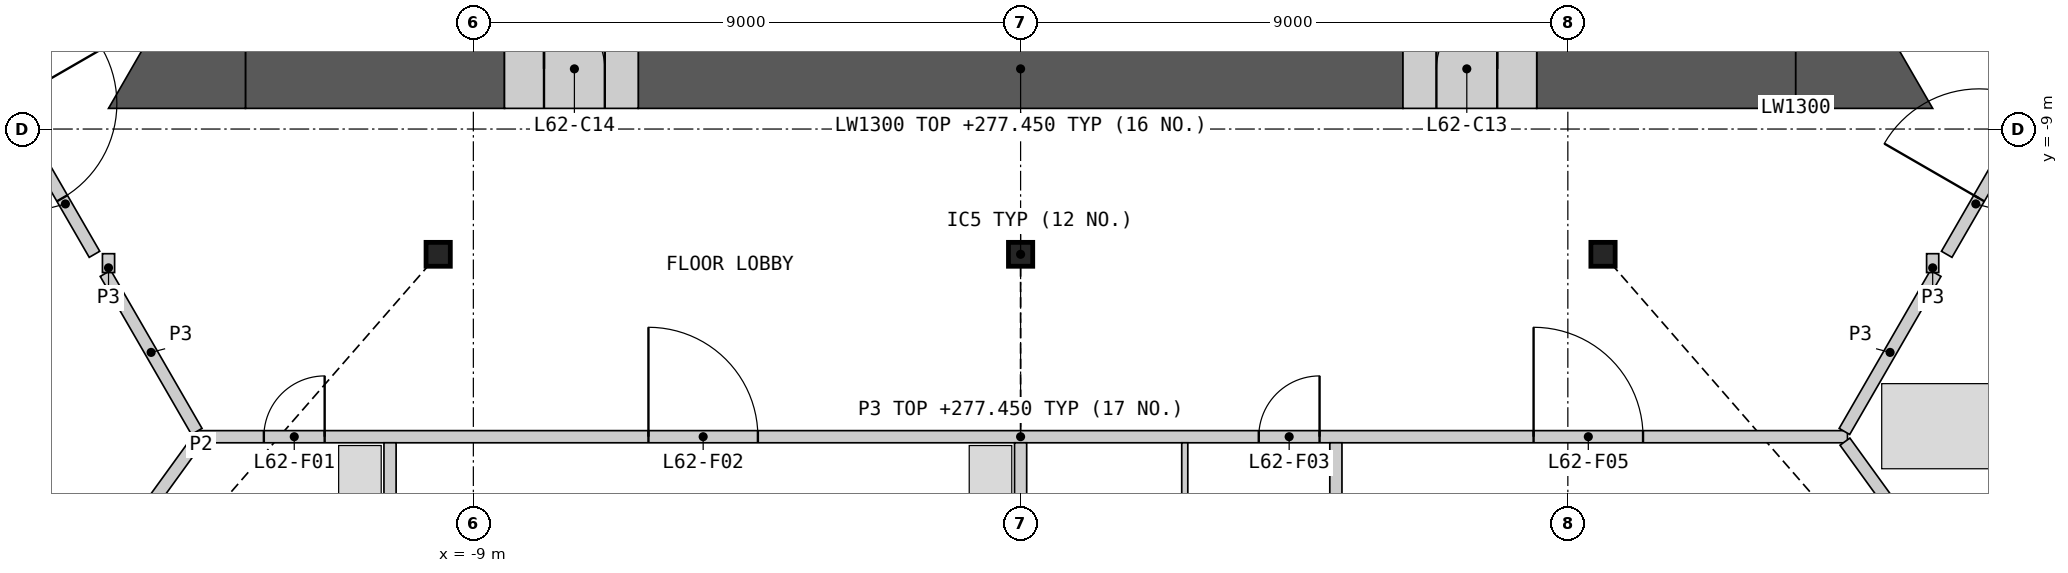
"""IFC4 building model, lengths in metres.
Left out: names, types, materials, properties, quantities, classifications, styles, units other than length and angle.
Written with IfcOpenShell. Run it as: python <this file> out.ifc"""

import sys

from ifc_helpers import new_model, si_unit, direction, frame, frame_2d, origin, origin_2d, place, context, subcontext, project, spatial, polyline, rectangle, i_section, outline, extrude, element, fill, save


model = new_model("IFC4")
c1 = context("Model", 3, precision=1e-05, world=origin(), true_north=direction((0.0, 1.0)))
c2 = subcontext(c1, "Body", "Model", "MODEL_VIEW")
j1 = project(units=[si_unit("LENGTHUNIT", "METRE"), si_unit("PLANEANGLEUNIT", "RADIAN")], contexts=[c1])
p1 = place(None, origin())
s1 = spatial("IfcSite", under=j1, at=p1, CompositionType="ELEMENT")
p2 = place(p1, origin())
s2 = spatial("IfcBuilding", under=s1, at=p2, CompositionType="ELEMENT")
p3 = place(p2, frame((0.0, 0.0, 274.2)))
s3 = spatial("IfcBuildingStorey", under=s2, at=p3, CompositionType="ELEMENT", Elevation=274.2)
for number, where, z_axis, x_axis in (
    (1, (-9.578, -11.06, 0.0), (0.0, 0.0, 1.0), (1.0, 0.0, 0.0)),
    (2, (0.0, -11.06, 0.0), (0.0, 0.0, 1.0), (1.0, 0.0, 0.0)),
    (3, (9.578, -11.06, 0.0), (0.0, 0.0, 1.0), (1.0, 0.0, 0.0)),
):
    element("IfcColumn", number, at=place(p3, frame(where, z_axis=z_axis, x_axis=x_axis)), inside=s3, PredefinedType="COLUMN", context=c2, shape_type="SweptSolid", body=[
        extrude(i_section(OverallWidth=0.399, OverallDepth=0.393, WebThickness=0.023, FlangeThickness=0.037, at=origin_2d()), origin(), (0.0, 0.0, 1.0), 3.6),
    ])
p4 = place(p3, frame((-6.288, -8.01, 0.0), z_axis=(0.0, 0.0, 1.0), x_axis=(1.0, 0.0, 0.0)))
e4 = element("IfcWall", 4, at=p4, inside=s3, PredefinedType="SHEAR", context=c2, shape_type="SweptSolid", body=[
    extrude(rectangle(XDim=12.576, YDim=1.3, at=frame_2d((6.288, 0.0))), origin(), (0.0, 0.0, 1.0), 3.25),
])
for number, where, z_axis, x_axis in (
    (5, (8.488, -8.01, 0.0), (0.0, 0.0, 1.0), (1.0, 0.0, 0.0)),
    (6, (-12.748, -8.01, 0.0), (0.0, 0.0, 1.0), (1.0, 0.0, 0.0)),
):
    element("IfcWall", number, at=place(p3, frame(where, z_axis=z_axis, x_axis=x_axis)), inside=s3, PredefinedType="SHEAR", context=c2, shape_type="SweptSolid", body=[
        extrude(rectangle(XDim=4.26, YDim=1.3, at=frame_2d((2.13, 0.0))), origin(), (0.0, 0.0, 1.0), 3.25),
    ])
p5 = place(p3, origin())
e7 = element("IfcWall", 7, at=p5, inside=s3, PredefinedType="SHEAR", context=c2, shape_type="SweptSolid", body=[
    extrude(outline(polyline([(12.748, -8.66), (12.748, -7.36), (13.874, -6.71), (15.0, -8.66), (12.748, -8.66)])), origin(), (0.0, 0.0, 1.0), 3.25),
])
p6 = place(p3, origin())
e8 = element("IfcWall", 8, at=p6, inside=s3, PredefinedType="SHEAR", context=c2, shape_type="SweptSolid", body=[
    extrude(outline(polyline([(-13.874, -6.71), (-12.748, -7.36), (-12.748, -8.66), (-15.0, -8.66), (-13.874, -6.71)])), origin(), (0.0, 0.0, 1.0), 3.25),
])
p7 = place(p3, frame((6.288, -8.01, 0.0), z_axis=(0.0, 0.0, 1.0), x_axis=(1.0, 0.0, 0.0)))
e9 = element("IfcWall", 9, at=p7, inside=s3, PredefinedType="SHEAR", context=c2, shape_type="SweptSolid", body=[
    extrude(rectangle(XDim=2.2, YDim=1.3, at=frame_2d((1.1, 0.0))), origin(), (0.0, 0.0, 1.0), 3.25),
])
p8 = place(p7, frame((0.55, 0.0, 0.0)))
e10 = element("IfcOpeningElement", 10, at=p8, cuts=e9, PredefinedType="OPENING", context=c2, shape_type="SweptSolid", body=[
    extrude(rectangle(XDim=1.0, YDim=2.1, at=frame_2d((0.5, 1.05))), frame((0.0, 0.66, 0.0), z_axis=(0.0, -1.0, 0.0), x_axis=(1.0, 0.0, 0.0)), (0.0, 0.0, 1.0), 1.32),
])
p9 = place(p3, frame((-8.488, -8.01, 0.0), z_axis=(0.0, 0.0, 1.0), x_axis=(1.0, 0.0, 0.0)))
e11 = element("IfcWall", 11, at=p9, inside=s3, PredefinedType="SHEAR", context=c2, shape_type="SweptSolid", body=[
    extrude(rectangle(XDim=2.2, YDim=1.3, at=frame_2d((1.1, 0.0))), origin(), (0.0, 0.0, 1.0), 3.25),
])
p10 = place(p9, frame((0.65, 0.0, 0.0)))
e12 = element("IfcOpeningElement", 12, at=p10, cuts=e11, PredefinedType="OPENING", context=c2, shape_type="SweptSolid", body=[
    extrude(rectangle(XDim=1.0, YDim=2.1, at=frame_2d((0.5, 1.05))), frame((0.0, 0.66, 0.0), z_axis=(0.0, -1.0, 0.0), x_axis=(1.0, 0.0, 0.0)), (0.0, 0.0, 1.0), 1.32),
])
p11 = place(p3, frame((-13.599, -14.06, 0.0), z_axis=(0.0, 0.0, 1.0), x_axis=(1.0, 0.0, 0.0)))
e13 = element("IfcWall", 13, at=p11, inside=s3, PredefinedType="PARTITIONING", context=c2, shape_type="SweptSolid", body=[
    extrude(rectangle(XDim=27.198, YDim=0.2, at=frame_2d((13.599, 0.0))), origin(), (0.0, 0.0, 1.0), 3.25),
])
p12 = place(p11, frame((1.153, 0.0, 0.0)))
e14 = element("IfcOpeningElement", 14, at=p12, cuts=e13, PredefinedType="OPENING", context=c2, shape_type="SweptSolid", body=[
    extrude(rectangle(XDim=1.0, YDim=2.1, at=frame_2d((0.5, 1.05))), frame((0.0, 0.11, 0.0), z_axis=(0.0, -1.0, 0.0), x_axis=(1.0, 0.0, 0.0)), (0.0, 0.0, 1.0), 0.22),
])
p13 = place(p11, frame((7.478, 0.0, 0.0)))
e15 = element("IfcOpeningElement", 15, at=p13, cuts=e13, PredefinedType="OPENING", context=c2, shape_type="SweptSolid", body=[
    extrude(rectangle(XDim=1.8, YDim=2.1, at=frame_2d((0.9, 1.05))), frame((0.0, 0.11, 0.0), z_axis=(0.0, -1.0, 0.0), x_axis=(1.0, 0.0, 0.0)), (0.0, 0.0, 1.0), 0.22),
])
p14 = place(p11, frame((17.516, 0.0, 0.0)))
e16 = element("IfcOpeningElement", 16, at=p14, cuts=e13, PredefinedType="OPENING", context=c2, shape_type="SweptSolid", body=[
    extrude(rectangle(XDim=1.0, YDim=2.1, at=frame_2d((0.5, 1.05))), frame((0.0, 0.11, 0.0), z_axis=(0.0, -1.0, 0.0), x_axis=(1.0, 0.0, 0.0)), (0.0, 0.0, 1.0), 0.22),
])
p15 = place(p11, frame((22.036, 0.0, 0.0)))
e17 = element("IfcOpeningElement", 17, at=p15, cuts=e13, PredefinedType="OPENING", context=c2, shape_type="SweptSolid", body=[
    extrude(rectangle(XDim=1.8, YDim=2.1, at=frame_2d((0.9, 1.05))), frame((0.0, 0.11, 0.0), z_axis=(0.0, -1.0, 0.0), x_axis=(1.0, 0.0, 0.0)), (0.0, 0.0, 1.0), 0.22),
])
p16 = place(p3, frame((-17.244, -7.747, 0.0), z_axis=(0.0, 0.0, 1.0), x_axis=(0.500017753321, 0.866015153657, 0.0)))
e18 = element("IfcWall", 18, at=p16, inside=s3, PredefinedType="PARTITIONING", context=c2, shape_type="SweptSolid", body=[
    extrude(rectangle(XDim=5.51, YDim=0.2, at=frame_2d((2.755, 0.0))), origin(), (0.0, 0.0, 1.0), 3.25),
])
p17 = place(p16, frame((1.956, 0.0, 0.0)))
e19 = element("IfcOpeningElement", 19, at=p17, cuts=e18, PredefinedType="OPENING", context=c2, shape_type="SweptSolid", body=[
    extrude(rectangle(XDim=1.8, YDim=2.1, at=frame_2d((0.9, 1.05))), frame((0.0, 0.11, 0.0), z_axis=(0.0, -1.0, 0.0), x_axis=(1.0, 0.0, 0.0)), (0.0, 0.0, 1.0), 0.22),
])
p18 = place(p3, frame((14.806, -3.524, 0.0), z_axis=(0.0, 0.0, 1.0), x_axis=(0.499999813892, -0.866025511234, 0.0)))
e20 = element("IfcWall", 20, at=p18, inside=s3, PredefinedType="PARTITIONING", context=c2, shape_type="SweptSolid", body=[
    extrude(rectangle(XDim=4.876, YDim=0.2, at=frame_2d((2.438, 0.0))), origin(), (0.0, 0.0, 1.0), 3.25),
])
p19 = place(p18, frame((3.37, 0.0, 0.0)))
e21 = element("IfcOpeningElement", 21, at=p19, cuts=e20, PredefinedType="OPENING", context=c2, shape_type="SweptSolid", body=[
    extrude(rectangle(XDim=1.1, YDim=2.1, at=frame_2d((0.55, 1.05))), frame((0.0, 0.11, 0.0), z_axis=(0.0, -1.0, 0.0), x_axis=(1.0, 0.0, 0.0)), (0.0, 0.0, 1.0), 0.22),
])
p20 = place(p3, frame((15.231, -11.06, 0.0), z_axis=(0.0, 0.0, 1.0), x_axis=(0.499961815444, 0.866047448526, 0.0)))
e22 = element("IfcWall", 22, at=p20, inside=s3, PredefinedType="PARTITIONING", context=c2, shape_type="SweptSolid", body=[
    extrude(rectangle(XDim=3.826, YDim=0.2, at=frame_2d((1.913, 0.0))), origin(), (0.0, 0.0, 1.0), 3.25),
])
p21 = place(p20, frame((1.064, 0.0, 0.0)))
e23 = element("IfcOpeningElement", 23, at=p21, cuts=e22, PredefinedType="OPENING", context=c2, shape_type="SweptSolid", body=[
    extrude(rectangle(XDim=1.8, YDim=2.1, at=frame_2d((0.9, 1.05))), frame((0.0, 0.11, 0.0), z_axis=(0.0, -1.0, 0.0), x_axis=(1.0, 0.0, 0.0)), (0.0, 0.0, 1.0), 0.22),
])
p22 = place(p3, frame((-17.144, -7.747, 0.0), z_axis=(0.0, 0.0, 1.0), x_axis=(0.499961815444, -0.866047448526, 0.0)))
e24 = element("IfcWall", 24, at=p22, inside=s3, PredefinedType="PARTITIONING", context=c2, shape_type="SweptSolid", body=[
    extrude(rectangle(XDim=3.826, YDim=0.2, at=frame_2d((1.913, 0.0))), origin(), (0.0, 0.0, 1.0), 3.25),
])
p23 = place(p22, frame((0.962, 0.0, 0.0)))
e25 = element("IfcOpeningElement", 25, at=p23, cuts=e24, PredefinedType="OPENING", context=c2, shape_type="SweptSolid", body=[
    extrude(rectangle(XDim=1.8, YDim=2.1, at=frame_2d((0.9, 1.05))), frame((0.0, 0.11, 0.0), z_axis=(0.0, -1.0, 0.0), x_axis=(1.0, 0.0, 0.0)), (0.0, 0.0, 1.0), 0.22),
])
for number, where, z_axis, x_axis in (
    (26, (13.549, -13.974, 0.0), (0.0, 0.0, 1.0), (0.5, 0.866, 0.0)),
    (27, (-15.05, -11.374, 0.0), (0.0, 0.0, 1.0), (0.5, -0.866, 0.0)),
):
    element("IfcWall", number, at=place(p3, frame(where, z_axis=z_axis, x_axis=x_axis)), inside=s3, PredefinedType="PARTITIONING", context=c2, shape_type="SweptSolid", body=[
        extrude(rectangle(XDim=3.002, YDim=0.2, at=frame_2d((1.501, 0.0))), origin(), (0.0, 0.0, 1.0), 3.25),
    ])
for number, where, z_axis, x_axis in (
    (28, (15.0, -11.36, 0.0), (0.0, 0.0, 1.0), (0.0, 1.0, 0.0)),
    (29, (-15.0, -11.36, 0.0), (0.0, 0.0, 1.0), (0.0, 1.0, 0.0)),
):
    element("IfcWall", number, at=place(p3, frame(where, z_axis=z_axis, x_axis=x_axis)), inside=s3, PredefinedType="PARTITIONING", context=c2, shape_type="SweptSolid", body=[
        extrude(rectangle(XDim=0.31, YDim=0.2, at=frame_2d((0.155, 0.0))), origin(), (0.0, 0.0, 1.0), 3.25),
    ])
p24 = place(p3, frame((13.557, -14.141, 0.0), z_axis=(0.0, 0.0, 1.0), x_axis=(0.586363418846, -0.810048110324, 0.0)))
e30 = element("IfcWall", 30, at=p24, inside=s3, PredefinedType="PARTITIONING", context=c2, shape_type="SweptSolid", body=[
    extrude(rectangle(XDim=11.658, YDim=0.2, at=frame_2d((5.829, 0.0))), origin(), (0.0, 0.0, 1.0), 2.404),
])
p25 = place(p3, origin())
e31 = element("IfcWall", 31, at=p25, inside=s3, PredefinedType="PARTITIONING", context=c2, shape_type="SweptSolid", body=[
    extrude(outline(polyline([(-13.476, -14.2), (-19.723, -22.83), (-20.432, -23.468), (-13.638, -14.083), (-13.476, -14.2)])), origin(), (0.0, 0.0, 1.0), 2.404),
])
for number, where, z_axis, x_axis in (
    (32, (-10.37, -23.527, 0.0), (0.0, 0.0, 1.0), (0.0, 1.0, 0.0)),
    (33, (0.0, -23.527, 0.0), (0.0, 0.0, 1.0), (0.0, 1.0, 0.0)),
):
    element("IfcWall", number, at=place(p3, frame(where, z_axis=z_axis, x_axis=x_axis)), inside=s3, PredefinedType="PARTITIONING", context=c2, shape_type="SweptSolid", body=[
        extrude(rectangle(XDim=9.366, YDim=0.2, at=frame_2d((4.683, 0.0))), origin(), (0.0, 0.0, 1.0), 2.404),
    ])
p26 = place(p3, frame((5.185, -18.855, 0.0), z_axis=(0.0, 0.0, 1.0), x_axis=(0.0, 1.0, 0.0)))
e34 = element("IfcWall", 34, at=p26, inside=s3, PredefinedType="PARTITIONING", context=c2, shape_type="SweptSolid", body=[
    extrude(rectangle(XDim=4.695, YDim=0.2, at=frame_2d((2.348, 0.0))), origin(), (0.0, 0.0, 1.0), 2.404),
])
p27 = place(p3, frame((2.7, -16.61, 0.0), z_axis=(0.0, 0.0, 1.0), x_axis=(0.0, 1.0, 0.0)))
e35 = element("IfcWall", 35, at=p27, inside=s3, PredefinedType="PARTITIONING", context=c2, shape_type="SweptSolid", body=[
    extrude(rectangle(XDim=2.45, YDim=0.1, at=frame_2d((1.225, 0.0))), origin(), (0.0, 0.0, 1.0), 2.404),
])
p28 = place(p12, origin())
e36 = element("IfcDoor", 36, at=p28, inside=s3, OperationType="SINGLE_SWING_RIGHT", PredefinedType="DOOR", context=c2, shape_type="SweptSolid", body=[
    extrude(rectangle(XDim=1.0, YDim=2.1, at=frame_2d((0.5, 1.05))), frame((0.0, 0.025, 0.0), z_axis=(0.0, -1.0, 0.0), x_axis=(1.0, 0.0, 0.0)), (0.0, 0.0, 1.0), 0.05),
])
fill(e14, e36)
p29 = place(p13, origin())
e37 = element("IfcDoor", 37, at=p29, inside=s3, OperationType="DOUBLE_DOOR_SINGLE_SWING", PredefinedType="DOOR", context=c2, shape_type="SweptSolid", body=[
    extrude(rectangle(XDim=1.8, YDim=2.1, at=frame_2d((0.9, 1.05))), frame((0.0, 0.025, 0.0), z_axis=(0.0, -1.0, 0.0), x_axis=(1.0, 0.0, 0.0)), (0.0, 0.0, 1.0), 0.05),
])
fill(e15, e37)
p30 = place(p14, origin())
e38 = element("IfcDoor", 38, at=p30, inside=s3, OperationType="SINGLE_SWING_RIGHT", PredefinedType="DOOR", context=c2, shape_type="SweptSolid", body=[
    extrude(rectangle(XDim=1.0, YDim=2.1, at=frame_2d((0.5, 1.05))), frame((0.0, 0.025, 0.0), z_axis=(0.0, -1.0, 0.0), x_axis=(1.0, 0.0, 0.0)), (0.0, 0.0, 1.0), 0.05),
])
fill(e16, e38)
p31 = place(p15, origin())
e39 = element("IfcDoor", 39, at=p31, inside=s3, OperationType="DOUBLE_DOOR_SINGLE_SWING", PredefinedType="DOOR", context=c2, shape_type="SweptSolid", body=[
    extrude(rectangle(XDim=1.8, YDim=2.1, at=frame_2d((0.9, 1.05))), frame((0.0, 0.025, 0.0), z_axis=(0.0, -1.0, 0.0), x_axis=(1.0, 0.0, 0.0)), (0.0, 0.0, 1.0), 0.05),
])
fill(e17, e39)
p32 = place(p21, origin())
e40 = element("IfcDoor", 40, at=p32, inside=s3, OperationType="DOUBLE_DOOR_SINGLE_SWING", PredefinedType="DOOR", context=c2, shape_type="SweptSolid", body=[
    extrude(rectangle(XDim=1.8, YDim=2.1, at=frame_2d((0.9, 1.05))), frame((0.0, 0.025, 0.0), z_axis=(0.0, -1.0, 0.0), x_axis=(1.0, 0.0, 0.0)), (0.0, 0.0, 1.0), 0.05),
])
fill(e23, e40)
p33 = place(p23, origin())
e41 = element("IfcDoor", 41, at=p33, inside=s3, OperationType="DOUBLE_DOOR_SINGLE_SWING", PredefinedType="DOOR", context=c2, shape_type="SweptSolid", body=[
    extrude(rectangle(XDim=1.8, YDim=2.1, at=frame_2d((0.9, 1.05))), frame((0.0, 0.025, 0.0), z_axis=(0.0, -1.0, 0.0), x_axis=(1.0, 0.0, 0.0)), (0.0, 0.0, 1.0), 0.05),
])
fill(e25, e41)
save(model, sys.argv[1])
